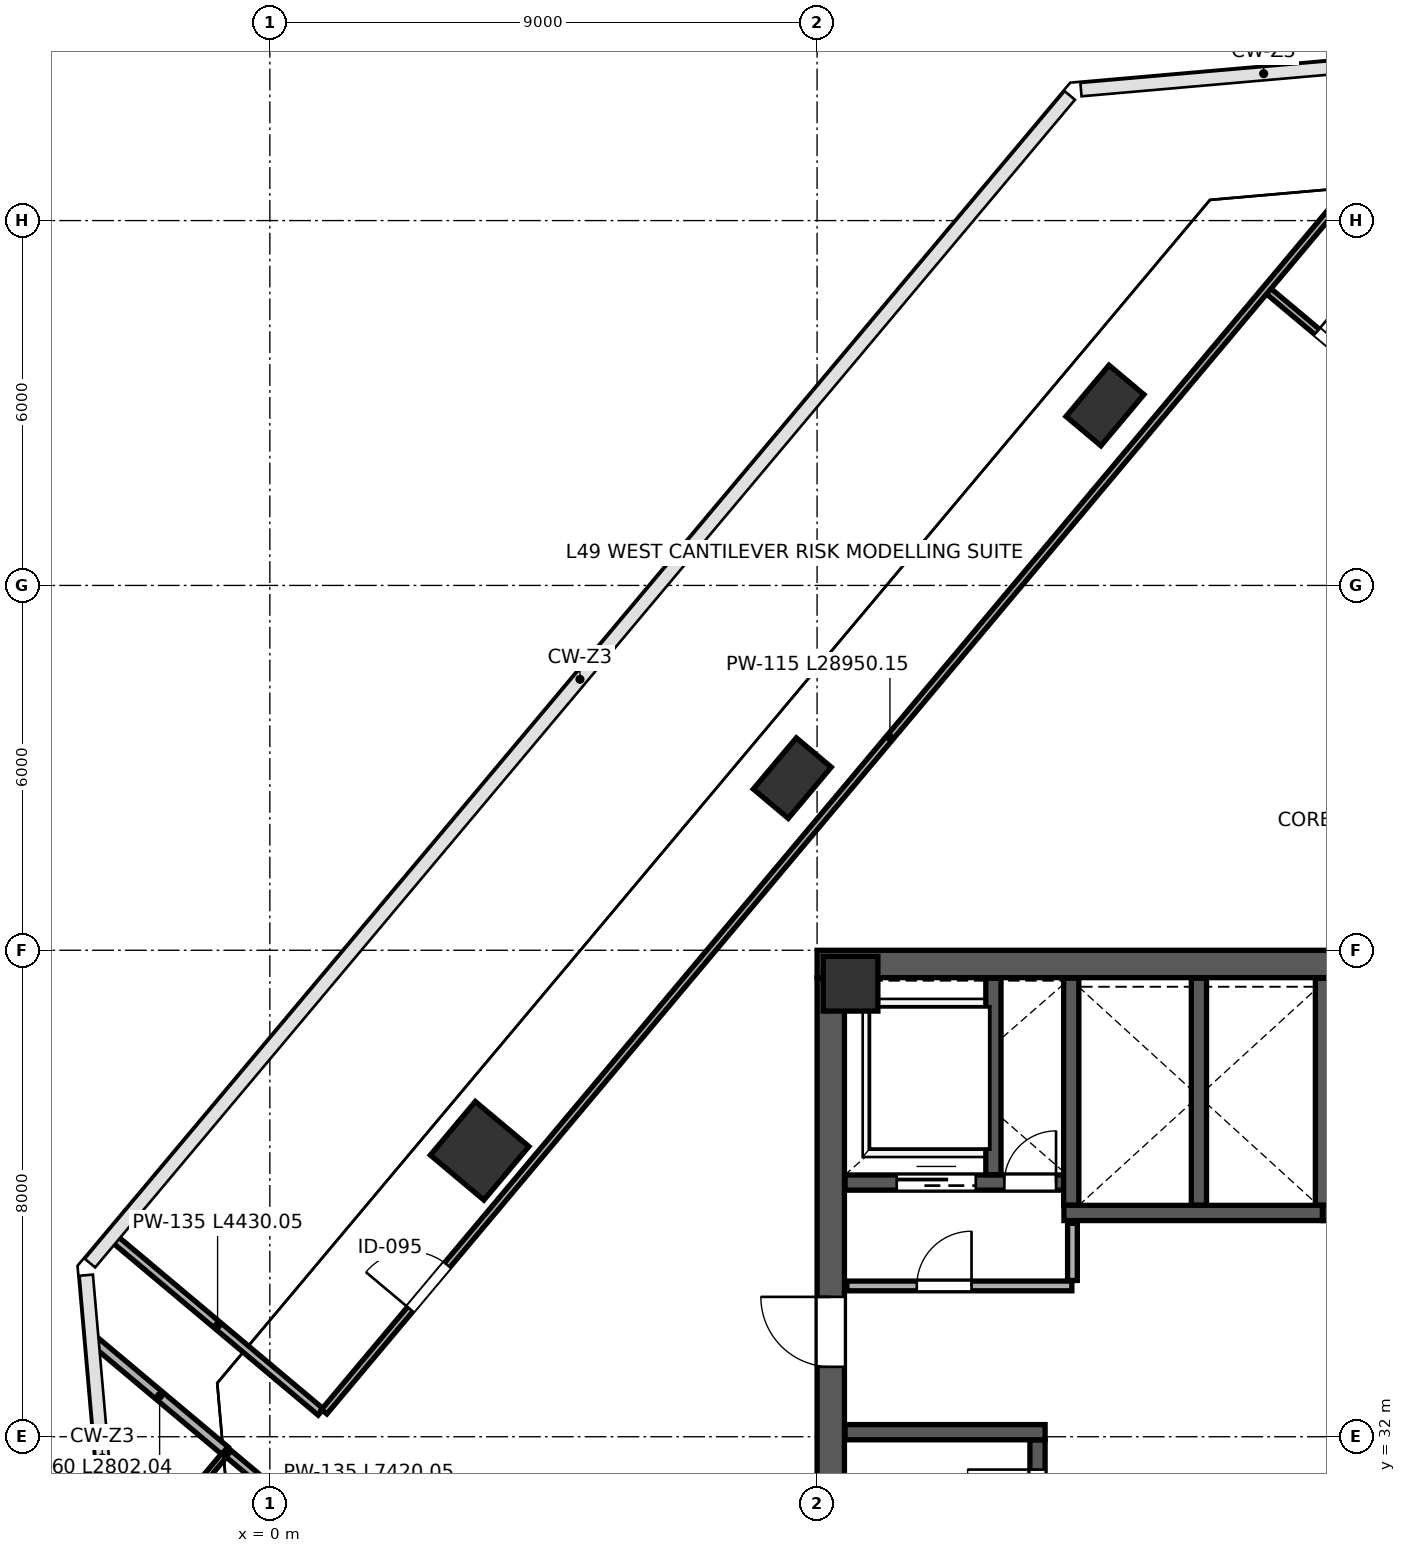
"""IFC4 building model, lengths in metres.
Left out: names, types, materials, properties, quantities, classifications, styles, units other than length and angle.
Written with IfcOpenShell. Run it as: python <this file> out.ifc"""

import sys

from ifc_helpers import new_model, si_unit, direction, frame, frame_2d, origin, origin_2d, place, context, subcontext, project, spatial, rectangle, extrude, source, transform, mapped, element, fill, save


model = new_model("IFC4")
c1 = context("Model", 3, precision=1e-05, world=origin(), true_north=direction((0.0, 1.0)))
c2 = subcontext(c1, "Body", "Model", "MODEL_VIEW")
j1 = project(units=[si_unit("LENGTHUNIT", "METRE"), si_unit("PLANEANGLEUNIT", "RADIAN")], contexts=[c1])
p1 = place(None, origin())
s1 = spatial("IfcSite", under=j1, at=p1, CompositionType="ELEMENT")
p2 = place(p1, origin())
s2 = spatial("IfcBuilding", under=s1, at=p2, CompositionType="ELEMENT")
p3 = place(p2, frame((0.0, 0.0, 220.6)))
s3 = spatial("IfcBuildingStorey", under=s2, at=p3, CompositionType="ELEMENT", Elevation=220.6)
m1 = source(origin(), c2, "Body", "SweptSolid", [
    extrude(rectangle(XDim=0.9, YDim=0.9, at=origin_2d()), origin(), (0.0, 0.0, 1.0), 4.198),
])
p4 = place(p3, frame((9.55, 39.45, 0.001), z_axis=(0.0, 0.0, 1.0), x_axis=(1.0, 0.0, 0.0)))
e1 = element("IfcColumn", 1, at=p4, inside=s3, PredefinedType="COLUMN", context=c2, shape_type="MappedRepresentation", body=[
    mapped(m1, transform((0.0, 0.0, 0.0), scale=1.0)),
])
m2 = source(origin(), c2, "Body", "SweptSolid", [
    extrude(rectangle(XDim=1.15, YDim=1.15, at=origin_2d()), origin(), (0.0, 0.0, 1.0), 4.198),
])
p5 = place(p3, frame((3.45, 36.703, 0.001), z_axis=(0.0, 0.0, 1.0), x_axis=(-0.766044443119, 0.642787609687, 0.0)))
e2 = element("IfcColumn", 2, at=p5, inside=s3, PredefinedType="COLUMN", context=c2, shape_type="MappedRepresentation", body=[
    mapped(m2, transform((0.0, 0.0, 0.0), scale=1.0)),
])
m3 = source(origin(), c2, "Body", "SweptSolid", [
    extrude(rectangle(XDim=0.75, YDim=1.1, at=origin_2d()), origin(), (0.0, 0.0, 1.0), 4.198),
])
for number, where, z_axis, x_axis in (
    (3, (8.592, 42.831, 0.001), (0.0, 0.0, 1.0), (-0.766, 0.643, 0.0)),
    (4, (13.735, 48.959, 0.001), (0.0, 0.0, 1.0), (-0.766, 0.643, 0.0)),
):
    element("IfcColumn", number, at=place(p3, frame(where, z_axis=z_axis, x_axis=x_axis)), inside=s3, PredefinedType="PILASTER", context=c2, shape_type="MappedRepresentation", body=[
        mapped(m3, transform((0.0, 0.0, 0.0), scale=1.0)),
    ])
p6 = place(p3, frame((9.225, 24.45, 0.0), z_axis=(0.0, 0.0, 1.0), x_axis=(0.0, 1.0, 0.0)))
e5 = element("IfcWall", 5, at=p6, inside=s3, PredefinedType="SHEAR", context=c2, shape_type="SweptSolid", body=[
    extrude(rectangle(XDim=15.1, YDim=0.45, at=frame_2d((7.55, 0.0))), origin(), (0.0, 0.0, 1.0), 3.96),
])
p7 = place(p6, frame((8.7, 0.0, 0.0)))
e6 = element("IfcOpeningElement", 6, at=p7, cuts=e5, PredefinedType="OPENING", context=c2, shape_type="SweptSolid", body=[
    extrude(rectangle(XDim=1.15, YDim=2.2, at=frame_2d((0.575, 1.1))), frame((0.0, 0.235, 0.0), z_axis=(0.0, -1.0, 0.0), x_axis=(1.0, 0.0, 0.0)), (0.0, 0.0, 1.0), 0.47),
])
p8 = place(p3, frame((9.0, 39.775, 0.0), z_axis=(0.0, 0.0, 1.0), x_axis=(1.0, 0.0, 0.0)))
e7 = element("IfcWall", 7, at=p8, inside=s3, PredefinedType="SHEAR", context=c2, shape_type="SweptSolid", body=[
    extrude(rectangle(XDim=18.0, YDim=0.45, at=frame_2d((9.0, 0.0))), origin(), (0.0, 0.0, 1.0), 3.96),
])
p9 = place(p3, frame((12.625, 24.46, 0.0), z_axis=(0.0, 0.0, 1.0), x_axis=(0.0, 1.0, 0.0)))
e8 = element("IfcWall", 8, at=p9, inside=s3, PredefinedType="SHEAR", context=c2, shape_type="SweptSolid", body=[
    extrude(rectangle(XDim=7.49, YDim=0.25, at=frame_2d((3.745, 0.0))), origin(), (0.0, 0.0, 1.0), 3.96),
])
p10 = place(p9, frame((5.85, 0.0, 0.0)))
e9 = element("IfcOpeningElement", 9, at=p10, cuts=e8, PredefinedType="OPENING", context=c2, shape_type="SweptSolid", body=[
    extrude(rectangle(XDim=1.15, YDim=2.2, at=frame_2d((0.575, 1.1))), frame((0.0, 0.135, 0.0), z_axis=(0.0, -1.0, 0.0), x_axis=(1.0, 0.0, 0.0)), (0.0, 0.0, 1.0), 0.27),
])
p11 = place(p3, frame((9.46, 32.075, 0.0), z_axis=(0.0, 0.0, 1.0), x_axis=(1.0, 0.0, 0.0)))
e10 = element("IfcWall", 10, at=p11, inside=s3, PredefinedType="SHEAR", context=c2, shape_type="SweptSolid", body=[
    extrude(rectangle(XDim=3.29, YDim=0.25, at=frame_2d((1.645, 0.0))), origin(), (0.0, 0.0, 1.0), 3.96),
])
p12 = place(p3, frame((9.46, 36.18, 0.0), z_axis=(0.0, 0.0, 1.0), x_axis=(1.0, 0.0, 0.0)))
e11 = element("IfcWall", 11, at=p12, inside=s3, PredefinedType="SHEAR", context=c2, shape_type="SweptSolid", body=[
    extrude(rectangle(XDim=3.79, YDim=0.25, at=frame_2d((1.895, 0.0))), origin(), (0.0, 0.0, 1.0), 3.96),
])
p13 = place(p12, frame((2.62, 0.0, 0.0)))
e12 = element("IfcOpeningElement", 12, at=p13, cuts=e11, PredefinedType="OPENING", context=c2, shape_type="SweptSolid", body=[
    extrude(rectangle(XDim=0.85, YDim=2.1, at=frame_2d((0.425, 1.05))), frame((0.0, 0.135, 0.0), z_axis=(0.0, -1.0, 0.0), x_axis=(1.0, 0.0, 0.0)), (0.0, 0.0, 1.0), 0.27),
])
p14 = place(p12, frame((0.85, 0.0, 0.0)))
e13 = element("IfcOpeningElement", 13, at=p14, cuts=e11, PredefinedType="OPENING", context=c2, shape_type="SweptSolid", body=[
    extrude(rectangle(XDim=1.3, YDim=2.25, at=frame_2d((0.65, 1.125))), frame((0.0, 0.135, 0.0), z_axis=(0.0, -1.0, 0.0), x_axis=(1.0, 0.0, 0.0)), (0.0, 0.0, 1.0), 0.27),
])
p15 = place(p3, frame((11.9, 36.31, 0.0), z_axis=(0.0, 0.0, 1.0), x_axis=(0.0, 1.0, 0.0)))
e14 = element("IfcWall", 14, at=p15, inside=s3, PredefinedType="SHEAR", context=c2, shape_type="SweptSolid", body=[
    extrude(rectangle(XDim=3.23, YDim=0.25, at=frame_2d((1.615, 0.0))), origin(), (0.0, 0.0, 1.0), 3.96),
])
p16 = place(p3, frame((13.06, 35.68, 0.0), z_axis=(0.0, 0.0, 1.0), x_axis=(1.0, 0.0, 0.0)))
e15 = element("IfcWall", 15, at=p16, inside=s3, PredefinedType="SHEAR", context=c2, shape_type="SweptSolid", body=[
    extrude(rectangle(XDim=4.25, YDim=0.25, at=frame_2d((2.125, 0.0))), origin(), (0.0, 0.0, 1.0), 3.96),
])
for number, where, z_axis, x_axis in (
    (16, (13.18, 35.81, 0.0), (0.0, 0.0, 1.0), (0.0, 1.0, 0.0)),
    (17, (15.28, 35.81, 0.0), (0.0, 0.0, 1.0), (0.0, 1.0, 0.0)),
):
    element("IfcWall", number, at=place(p3, frame(where, z_axis=z_axis, x_axis=x_axis)), inside=s3, PredefinedType="SHEAR", context=c2, shape_type="SweptSolid", body=[
        extrude(rectangle(XDim=3.73, YDim=0.25, at=frame_2d((1.865, 0.0))), origin(), (0.0, 0.0, 1.0), 3.96),
    ])
p17 = place(p3, frame((17.32, 35.68, 0.0), z_axis=(0.0, 0.0, 1.0), x_axis=(1.0, 0.0, 0.0)))
e18 = element("IfcWall", 18, at=p17, inside=s3, PredefinedType="SHEAR", context=c2, shape_type="SweptSolid", body=[
    extrude(rectangle(XDim=3.87, YDim=0.25, at=frame_2d((1.935, 0.0))), origin(), (0.0, 0.0, 1.0), 3.96),
])
p18 = place(p17, frame((0.45, 0.0, 0.0)))
e19 = element("IfcOpeningElement", 19, at=p18, cuts=e18, PredefinedType="OPENING", context=c2, shape_type="SweptSolid", body=[
    extrude(rectangle(XDim=1.1, YDim=2.2, at=frame_2d((0.55, 1.1))), frame((0.0, 0.135, 0.0), z_axis=(0.0, -1.0, 0.0), x_axis=(1.0, 0.0, 0.0)), (0.0, 0.0, 1.0), 0.27),
])
p19 = place(p17, frame((2.35, 0.0, 0.0)))
e20 = element("IfcOpeningElement", 20, at=p19, cuts=e18, PredefinedType="OPENING", context=c2, shape_type="SweptSolid", body=[
    extrude(rectangle(XDim=1.1, YDim=2.2, at=frame_2d((0.55, 1.1))), frame((0.0, 0.135, 0.0), z_axis=(0.0, -1.0, 0.0), x_axis=(1.0, 0.0, 0.0)), (0.0, 0.0, 1.0), 0.27),
])
p20 = place(p3, frame((17.32, 35.81, 0.0), z_axis=(0.0, 0.0, 1.0), x_axis=(0.0, 1.0, 0.0)))
e21 = element("IfcWall", 21, at=p20, inside=s3, PredefinedType="SHEAR", context=c2, shape_type="SweptSolid", body=[
    extrude(rectangle(XDim=3.73, YDim=0.25, at=frame_2d((1.865, 0.0))), origin(), (0.0, 0.0, 1.0), 3.96),
])
p21 = place(p3, frame((9.49, 34.48, 0.0), z_axis=(0.0, 0.0, 1.0), x_axis=(1.0, 0.0, 0.0)))
e22 = element("IfcWall", 22, at=p21, inside=s3, PredefinedType="PARTITIONING", context=c2, shape_type="SweptSolid", body=[
    extrude(rectangle(XDim=3.7, YDim=0.16, at=frame_2d((1.85, 0.0))), origin(), (0.0, 0.0, 1.0), 3.96),
])
p22 = place(p21, frame((1.15, 0.0, 0.0)))
e23 = element("IfcOpeningElement", 23, at=p22, cuts=e22, PredefinedType="OPENING", context=c2, shape_type="SweptSolid", body=[
    extrude(rectangle(XDim=0.9, YDim=2.15, at=frame_2d((0.45, 1.075))), frame((0.0, 0.09, 0.0), z_axis=(0.0, -1.0, 0.0), x_axis=(1.0, 0.0, 0.0)), (0.0, 0.0, 1.0), 0.18),
])
p23 = place(p3, frame((13.2, 34.57, 0.0), z_axis=(0.0, 0.0, 1.0), x_axis=(0.0, 1.0, 0.0)))
e24 = element("IfcWall", 24, at=p23, inside=s3, PredefinedType="PARTITIONING", context=c2, shape_type="SweptSolid", body=[
    extrude(rectangle(XDim=0.94, YDim=0.16, at=frame_2d((0.47, 0.0))), origin(), (0.0, 0.0, 1.0), 3.96),
])
p24 = place(p3, frame((-2.536, 29.569, 0.0), z_axis=(0.0, 0.0, 1.0), x_axis=(0.642777228426, 0.766053153911, 0.0)))
e25 = element("IfcWall", 25, at=p24, inside=s3, PredefinedType="PARTITIONING", context=c2, shape_type="SweptSolid", body=[
    extrude(rectangle(XDim=2.802, YDim=0.1, at=frame_2d((1.401, 0.0))), origin(), (0.0, 0.0, 1.0), 3.96),
])
p25 = place(p3, frame((-2.886, 33.573, 0.0), z_axis=(0.0, 0.0, 1.0), x_axis=(0.766060058075, -0.642769000048, 0.0)))
e26 = element("IfcWall", 26, at=p25, inside=s3, PredefinedType="PARTITIONING", context=c2, shape_type="SweptSolid", body=[
    extrude(rectangle(XDim=2.802, YDim=0.16, at=frame_2d((1.401, 0.0))), origin(), (0.0, 0.0, 1.0), 3.96),
])
p26 = place(p3, frame((-0.678, 31.721, 0.0), z_axis=(0.0, 0.0, 1.0), x_axis=(0.766043108328, -0.642789200425, 0.0)))
e27 = element("IfcWall", 27, at=p26, inside=s3, PredefinedType="PARTITIONING", context=c2, shape_type="SweptSolid", body=[
    extrude(rectangle(XDim=7.42, YDim=0.135, at=frame_2d((3.71, 0.0))), origin(), (0.0, 0.0, 1.0), 3.96),
])
p27 = place(p26, frame((2.9, 0.0, 0.0)))
e28 = element("IfcOpeningElement", 28, at=p27, cuts=e27, PredefinedType="OPENING", context=c2, shape_type="SweptSolid", body=[
    extrude(rectangle(XDim=0.9, YDim=2.15, at=frame_2d((0.45, 1.075))), frame((0.0, 0.078, 0.0), z_axis=(0.0, -1.0, 0.0), x_axis=(1.0, 0.0, 0.0)), (0.0, 0.0, 1.0), 0.155),
])
p28 = place(p26, frame((5.0, 0.0, 0.0)))
e29 = element("IfcOpeningElement", 29, at=p28, cuts=e27, PredefinedType="OPENING", context=c2, shape_type="SweptSolid", body=[
    extrude(rectangle(XDim=0.95, YDim=2.15, at=frame_2d((0.475, 1.075))), frame((0.0, 0.078, 0.0), z_axis=(0.0, -1.0, 0.0), x_axis=(1.0, 0.0, 0.0)), (0.0, 0.0, 1.0), 0.155),
])
p29 = place(p3, frame((16.416, 50.848, 0.0), z_axis=(0.0, 0.0, 1.0), x_axis=(0.766043174175, -0.642789121951, 0.0)))
e30 = element("IfcWall", 30, at=p29, inside=s3, PredefinedType="PARTITIONING", context=c2, shape_type="SweptSolid", body=[
    extrude(rectangle(XDim=22.27, YDim=0.115, at=frame_2d((11.135, 0.0))), origin(), (0.0, 0.0, 1.0), 3.96),
])
p30 = place(p29, frame((1.05, 0.0, 0.0)))
e31 = element("IfcOpeningElement", 31, at=p30, cuts=e30, PredefinedType="OPENING", context=c2, shape_type="SweptSolid", body=[
    extrude(rectangle(XDim=0.95, YDim=2.15, at=frame_2d((0.475, 1.075))), frame((0.0, 0.067, 0.0), z_axis=(0.0, -1.0, 0.0), x_axis=(1.0, 0.0, 0.0)), (0.0, 0.0, 1.0), 0.135),
])
p31 = place(p29, frame((9.8, 0.0, 0.0)))
e32 = element("IfcOpeningElement", 32, at=p31, cuts=e30, PredefinedType="OPENING", context=c2, shape_type="SweptSolid", body=[
    extrude(rectangle(XDim=0.95, YDim=2.15, at=frame_2d((0.475, 1.075))), frame((0.0, 0.067, 0.0), z_axis=(0.0, -1.0, 0.0), x_axis=(1.0, 0.0, 0.0)), (0.0, 0.0, 1.0), 0.135),
])
p32 = place(p3, frame((-2.556, 35.254, 0.0), z_axis=(0.0, 0.0, 1.0), x_axis=(0.76603046424, -0.642804268698, 0.0)))
e33 = element("IfcWall", 33, at=p32, inside=s3, PredefinedType="PARTITIONING", context=c2, shape_type="SweptSolid", body=[
    extrude(rectangle(XDim=4.43, YDim=0.135, at=frame_2d((2.215, 0.0))), origin(), (0.0, 0.0, 1.0), 3.96),
])
p33 = place(p3, frame((0.894, 32.412, 0.0), z_axis=(0.0, 0.0, 1.0), x_axis=(0.642782006196, 0.766049144971, 0.0)))
e34 = element("IfcWall", 34, at=p33, inside=s3, PredefinedType="PARTITIONING", context=c2, shape_type="SweptSolid", body=[
    extrude(rectangle(XDim=28.95, YDim=0.115, at=frame_2d((14.475, 0.0))), origin(), (0.0, 0.0, 1.0), 3.96),
])
p34 = place(p33, frame((2.2, 0.0, 0.0)))
e35 = element("IfcOpeningElement", 35, at=p34, cuts=e34, PredefinedType="OPENING", context=c2, shape_type="SweptSolid", body=[
    extrude(rectangle(XDim=0.95, YDim=2.15, at=frame_2d((0.475, 1.075))), frame((0.0, 0.067, 0.0), z_axis=(0.0, -1.0, 0.0), x_axis=(1.0, 0.0, 0.0)), (0.0, 0.0, 1.0), 0.135),
])
m4 = source(origin(), c2, "Body", "SweptSolid", [
    extrude(rectangle(XDim=1.15, YDim=2.2, at=frame_2d((0.575, 1.1))), frame((0.0, 0.025, 0.0), z_axis=(0.0, -1.0, 0.0), x_axis=(1.0, 0.0, 0.0)), (0.0, 0.0, 1.0), 0.05),
])
p35 = place(p10, origin())
e36 = element("IfcDoor", 36, at=p35, inside=s3, OperationType="SINGLE_SWING_RIGHT", PredefinedType="DOOR", context=c2, shape_type="MappedRepresentation", body=[
    mapped(m4, transform((0.0, 0.0, 0.0), scale=1.0)),
])
fill(e9, e36)
m5 = source(origin(), c2, "Body", "SweptSolid", [
    extrude(rectangle(XDim=1.15, YDim=2.2, at=frame_2d((0.575, 1.1))), frame((0.0, 0.025, 0.0), z_axis=(0.0, -1.0, 0.0), x_axis=(1.0, 0.0, 0.0)), (0.0, 0.0, 1.0), 0.05),
])
p36 = place(p7, origin())
e37 = element("IfcDoor", 37, at=p36, inside=s3, OperationType="SINGLE_SWING_RIGHT", PredefinedType="DOOR", context=c2, shape_type="MappedRepresentation", body=[
    mapped(m5, transform((0.0, 0.0, 0.0), scale=1.0)),
])
fill(e6, e37)
m6 = source(origin(), c2, "Body", "SweptSolid", [
    extrude(rectangle(XDim=0.85, YDim=2.1, at=frame_2d((0.425, 1.05))), frame((0.0, 0.025, 0.0), z_axis=(0.0, -1.0, 0.0), x_axis=(1.0, 0.0, 0.0)), (0.0, 0.0, 1.0), 0.05),
])
p37 = place(p13, origin())
e38 = element("IfcDoor", 38, at=p37, inside=s3, OperationType="SINGLE_SWING_RIGHT", PredefinedType="DOOR", context=c2, shape_type="MappedRepresentation", body=[
    mapped(m6, transform((0.0, 0.0, 0.0), scale=1.0)),
])
fill(e12, e38)
m7 = source(origin(), c2, "Body", "SweptSolid", [
    extrude(rectangle(XDim=1.3, YDim=2.25, at=frame_2d((0.65, 1.125))), frame((0.0, 0.025, 0.0), z_axis=(0.0, -1.0, 0.0), x_axis=(1.0, 0.0, 0.0)), (0.0, 0.0, 1.0), 0.05),
])
p38 = place(p14, origin())
e39 = element("IfcDoor", 39, at=p38, inside=s3, OperationType="SLIDING_TO_LEFT", PredefinedType="DOOR", context=c2, shape_type="MappedRepresentation", body=[
    mapped(m7, transform((0.0, 0.0, 0.0), scale=1.0)),
])
fill(e13, e39)
m8 = source(origin(), c2, "Body", "SweptSolid", [
    extrude(rectangle(XDim=0.9, YDim=2.15, at=frame_2d((0.45, 1.075))), frame((0.0, 0.025, 0.0), z_axis=(0.0, -1.0, 0.0), x_axis=(1.0, 0.0, 0.0)), (0.0, 0.0, 1.0), 0.05),
])
p39 = place(p22, origin())
e40 = element("IfcDoor", 40, at=p39, inside=s3, OperationType="SINGLE_SWING_RIGHT", PredefinedType="DOOR", context=c2, shape_type="MappedRepresentation", body=[
    mapped(m8, transform((0.0, 0.0, 0.0), scale=1.0)),
])
fill(e23, e40)
m9 = source(origin(), c2, "Body", "SweptSolid", [
    extrude(rectangle(XDim=0.95, YDim=2.15, at=frame_2d((0.475, 1.075))), frame((0.0, 0.025, 0.0), z_axis=(0.0, -1.0, 0.0), x_axis=(1.0, 0.0, 0.0)), (0.0, 0.0, 1.0), 0.05),
])
p40 = place(p30, origin())
e41 = element("IfcDoor", 41, at=p40, inside=s3, OperationType="SINGLE_SWING_LEFT", PredefinedType="DOOR", context=c2, shape_type="MappedRepresentation", body=[
    mapped(m9, transform((0.0, 0.0, 0.0), scale=1.0)),
])
fill(e31, e41)
p41 = place(p34, origin())
e42 = element("IfcDoor", 42, at=p41, inside=s3, OperationType="SINGLE_SWING_LEFT", PredefinedType="DOOR", context=c2, shape_type="MappedRepresentation", body=[
    mapped(m9, transform((0.0, 0.0, 0.0), scale=1.0)),
])
fill(e35, e42)
save(model, sys.argv[1])
